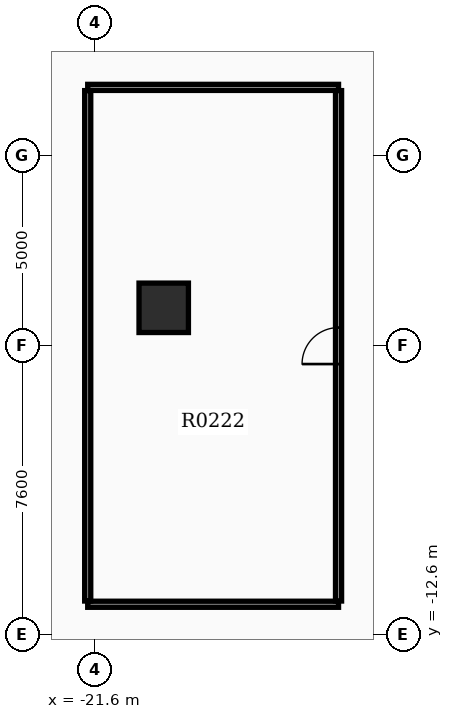
"""IFC4 building model, lengths in metres.
Left out: names, types, materials, properties, quantities, classifications, styles, units other than length and angle.
Written with IfcOpenShell. Run it as: python <this file> out.ifc"""

import sys

from ifc_helpers import new_model, si_unit, direction, frame, frame_2d, origin, origin_2d, place, context, subcontext, project, spatial, rectangle, extrude, element, fill, save


model = new_model("IFC4")
c1 = context("Model", 3, precision=1e-05, world=origin(), true_north=direction((0.0, 1.0)))
c2 = subcontext(c1, "Body", "Model", "MODEL_VIEW")
j1 = project(units=[si_unit("LENGTHUNIT", "METRE"), si_unit("PLANEANGLEUNIT", "RADIAN")], contexts=[c1])
p1 = place(None, origin())
s1 = spatial("IfcSite", under=j1, at=p1, CompositionType="ELEMENT")
p2 = place(p1, origin())
s2 = spatial("IfcBuilding", under=s1, at=p2, CompositionType="ELEMENT")
p3 = place(p2, frame((0.0, 0.0, 14.7)))
s3 = spatial("IfcBuildingStorey", under=s2, at=p3, CompositionType="ELEMENT", Elevation=14.7)
p4 = place(p3, frame((-19.8, -4.0, 0.0), z_axis=(0.0, 0.0, 1.0), x_axis=(1.0, 0.0, 0.0)))
e1 = element("IfcColumn", 1, at=p4, inside=s3, PredefinedType="COLUMN", context=c2, shape_type="SweptSolid", body=[
    extrude(rectangle(XDim=1.3, YDim=1.3, at=origin_2d()), origin(), (0.0, 0.0, 1.0), 4.5),
])
for number, where, z_axis, x_axis in (
    (2, (-21.8, -11.8, 0.0), (0.0, 0.0, 1.0), (1.0, 0.0, 0.0)),
    (3, (-21.8, 1.8, 0.0), (0.0, 0.0, 1.0), (1.0, 0.0, 0.0)),
):
    element("IfcWall", number, at=place(p3, frame(where, z_axis=z_axis, x_axis=x_axis)), inside=s3, PredefinedType="PARTITIONING", context=c2, shape_type="SweptSolid", body=[
        extrude(rectangle(XDim=6.6, YDim=0.16, at=frame_2d((3.3, 0.0))), origin(), (0.0, 0.0, 1.0), 3.32),
    ])
p5 = place(p3, frame((-21.8, -11.715, 0.0), z_axis=(0.0, 0.0, 1.0), x_axis=(0.0, 1.0, 0.0)))
e4 = element("IfcWall", 4, at=p5, inside=s3, PredefinedType="PARTITIONING", context=c2, shape_type="SweptSolid", body=[
    extrude(rectangle(XDim=13.43, YDim=0.16, at=frame_2d((6.715, 0.0))), origin(), (0.0, 0.0, 1.0), 3.32),
])
p6 = place(p3, frame((-15.2, -11.715, 0.0), z_axis=(0.0, 0.0, 1.0), x_axis=(0.0, 1.0, 0.0)))
e5 = element("IfcWall", 5, at=p6, inside=s3, PredefinedType="PARTITIONING", context=c2, shape_type="SweptSolid", body=[
    extrude(rectangle(XDim=13.43, YDim=0.16, at=frame_2d((6.715, 0.0))), origin(), (0.0, 0.0, 1.0), 3.32),
])
p7 = place(p6, frame((6.235, 0.0, 0.0)))
e6 = element("IfcOpeningElement", 6, at=p7, cuts=e5, PredefinedType="OPENING", context=c2, shape_type="SweptSolid", body=[
    extrude(rectangle(XDim=0.96, YDim=2.15, at=frame_2d((0.48, 1.075))), frame((0.0, 0.09, 0.0), z_axis=(0.0, -1.0, 0.0), x_axis=(1.0, 0.0, 0.0)), (0.0, 0.0, 1.0), 0.18),
])
p8 = place(p7, origin())
e7 = element("IfcDoor", 7, at=p8, inside=s3, OperationType="SINGLE_SWING_LEFT", PredefinedType="DOOR", context=c2, shape_type="SweptSolid", body=[
    extrude(rectangle(XDim=0.96, YDim=2.15, at=frame_2d((0.48, 1.075))), frame((0.0, 0.025, 0.0), z_axis=(0.0, -1.0, 0.0), x_axis=(1.0, 0.0, 0.0)), (0.0, 0.0, 1.0), 0.05),
])
fill(e6, e7)
save(model, sys.argv[1])
